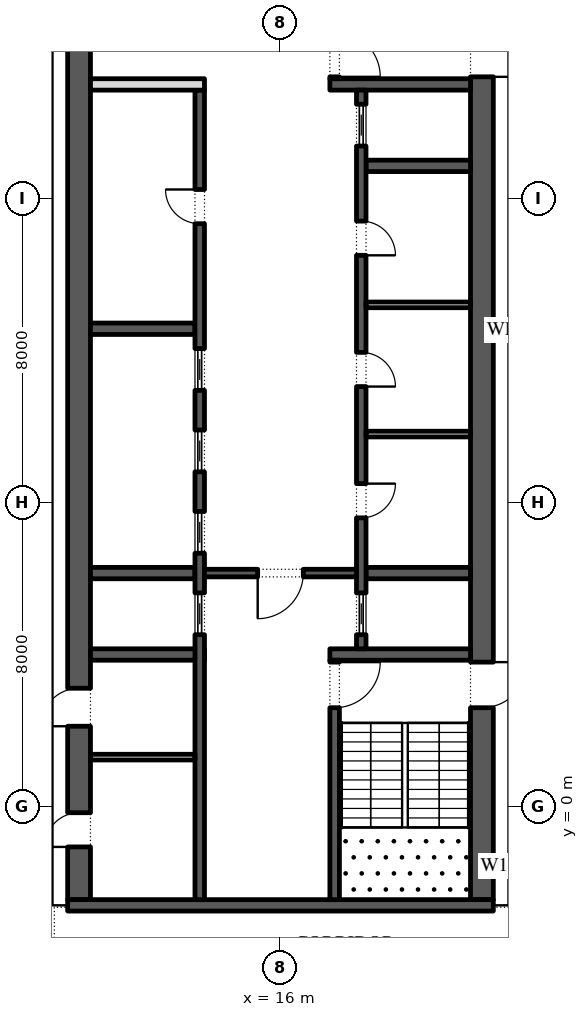
"""IFC4 building model, lengths in metres.
Left out: names, types, materials, properties, quantities, classifications, styles, units other than length and angle.
Written with IfcOpenShell. Run it as: python <this file> out.ifc"""

import sys

from ifc_helpers import new_model, si_unit, direction, frame, frame_2d, origin, place, context, subcontext, project, spatial, rectangle, extrude, element, fill, save


model = new_model("IFC4")
c1 = context("Model", 3, precision=1e-05, world=origin(), true_north=direction((0.0, 1.0)))
c2 = subcontext(c1, "Body", "Model", "MODEL_VIEW")
j1 = project(units=[si_unit("LENGTHUNIT", "METRE"), si_unit("PLANEANGLEUNIT", "RADIAN")], contexts=[c1])
p1 = place(None, origin())
s1 = spatial("IfcSite", under=j1, at=p1, CompositionType="ELEMENT")
p2 = place(p1, origin())
s2 = spatial("IfcBuilding", under=s1, at=p2, CompositionType="ELEMENT")
p3 = place(p2, frame((0.0, 0.0, 264.0)))
s3 = spatial("IfcBuildingStorey", under=s2, at=p3, CompositionType="ELEMENT", Elevation=264.0)
p4 = place(p3, frame((21.359, -11.678, 0.0), z_axis=(0.0, 0.0, 1.0), x_axis=(0.224949198343, 0.974370493275, 0.0)))
e1 = element("IfcWall", 1, at=p4, inside=s3, PredefinedType="STANDARD", context=c2, shape_type="SweptSolid", body=[
    extrude(rectangle(XDim=49.5, YDim=0.3, at=frame_2d((24.75, 0.0))), origin(), (0.0, 0.0, 1.0), 4.0),
])
p5 = place(p4, frame((1.157, 0.0, 0.45)))
e2 = element("IfcOpeningElement", 2, at=p5, cuts=e1, PredefinedType="OPENING", context=c2, shape_type="SweptSolid", body=[
    extrude(rectangle(XDim=4.5, YDim=3.05, at=frame_2d((2.25, 1.525))), frame((0.0, 0.16, 0.0), z_axis=(0.0, -1.0, 0.0), x_axis=(1.0, 0.0, 0.0)), (0.0, 0.0, 1.0), 0.32),
])
p6 = place(p4, frame((8.121, 0.0, 0.45)))
e3 = element("IfcOpeningElement", 3, at=p6, cuts=e1, PredefinedType="OPENING", context=c2, shape_type="SweptSolid", body=[
    extrude(rectangle(XDim=4.5, YDim=3.05, at=frame_2d((2.25, 1.525))), frame((0.0, 0.16, 0.0), z_axis=(0.0, -1.0, 0.0), x_axis=(1.0, 0.0, 0.0)), (0.0, 0.0, 1.0), 0.32),
])
p7 = place(p4, frame((15.236, 0.0, 0.45)))
e4 = element("IfcOpeningElement", 4, at=p7, cuts=e1, PredefinedType="OPENING", context=c2, shape_type="SweptSolid", body=[
    extrude(rectangle(XDim=4.5, YDim=3.05, at=frame_2d((2.25, 1.525))), frame((0.0, 0.16, 0.0), z_axis=(0.0, -1.0, 0.0), x_axis=(1.0, 0.0, 0.0)), (0.0, 0.0, 1.0), 0.32),
])
p8 = place(p4, frame((22.35, 0.0, 0.45)))
e5 = element("IfcOpeningElement", 5, at=p8, cuts=e1, PredefinedType="OPENING", context=c2, shape_type="SweptSolid", body=[
    extrude(rectangle(XDim=4.5, YDim=3.05, at=frame_2d((2.25, 1.525))), frame((0.0, 0.16, 0.0), z_axis=(0.0, -1.0, 0.0), x_axis=(1.0, 0.0, 0.0)), (0.0, 0.0, 1.0), 0.32),
])
p9 = place(p4, frame((29.464, 0.0, 0.45)))
e6 = element("IfcOpeningElement", 6, at=p9, cuts=e1, PredefinedType="OPENING", context=c2, shape_type="SweptSolid", body=[
    extrude(rectangle(XDim=4.5, YDim=2.95, at=frame_2d((2.25, 1.475))), frame((0.0, 0.16, 0.0), z_axis=(0.0, -1.0, 0.0), x_axis=(1.0, 0.0, 0.0)), (0.0, 0.0, 1.0), 0.32),
])
p10 = place(p4, frame((37.628, 0.0, 0.0)))
e7 = element("IfcOpeningElement", 7, at=p10, cuts=e1, PredefinedType="OPENING", context=c2, shape_type="SweptSolid", body=[
    extrude(rectangle(XDim=2.4, YDim=3.325, at=frame_2d((1.2, 1.663))), frame((0.0, 0.16, 0.0), z_axis=(0.0, -1.0, 0.0), x_axis=(1.0, 0.0, 0.0)), (0.0, 0.0, 1.0), 0.32),
])
p11 = place(p4, frame((43.693, 0.0, 0.45)))
e8 = element("IfcOpeningElement", 8, at=p11, cuts=e1, PredefinedType="OPENING", context=c2, shape_type="SweptSolid", body=[
    extrude(rectangle(XDim=4.5, YDim=3.05, at=frame_2d((2.25, 1.525))), frame((0.0, 0.16, 0.0), z_axis=(0.0, -1.0, 0.0), x_axis=(1.0, 0.0, 0.0)), (0.0, 0.0, 1.0), 0.32),
])
p12 = place(p3, frame((21.3, -2.45, 0.0), z_axis=(0.0, 0.0, 1.0), x_axis=(0.0, 1.0, 0.0)))
e9 = element("IfcWall", 9, at=p12, inside=s3, PredefinedType="SHEAR", context=c2, shape_type="SweptSolid", body=[
    extrude(rectangle(XDim=27.9, YDim=0.6, at=frame_2d((13.95, 0.0))), origin(), (0.0, 0.0, 1.0), 4.0),
])
p13 = place(p12, frame((5.05, 0.0, 0.0)))
e10 = element("IfcOpeningElement", 10, at=p13, cuts=e9, PredefinedType="OPENING", context=c2, shape_type="SweptSolid", body=[
    extrude(rectangle(XDim=1.2, YDim=2.1, at=frame_2d((0.6, 1.05))), frame((0.0, 0.31, 0.0), z_axis=(0.0, -1.0, 0.0), x_axis=(1.0, 0.0, 0.0)), (0.0, 0.0, 1.0), 0.62),
])
p14 = place(p12, frame((21.65, 0.0, 0.0)))
e11 = element("IfcOpeningElement", 11, at=p14, cuts=e9, PredefinedType="OPENING", context=c2, shape_type="SweptSolid", body=[
    extrude(rectangle(XDim=1.2, YDim=2.1, at=frame_2d((0.6, 1.05))), frame((0.0, 0.31, 0.0), z_axis=(0.0, -1.0, 0.0), x_axis=(1.0, 0.0, 0.0)), (0.0, 0.0, 1.0), 0.62),
])
p15 = place(p3, frame((10.7, -2.45, 0.0), z_axis=(0.0, 0.0, 1.0), x_axis=(0.0, 1.0, 0.0)))
e12 = element("IfcWall", 12, at=p15, inside=s3, PredefinedType="SHEAR", context=c2, shape_type="SweptSolid", body=[
    extrude(rectangle(XDim=27.9, YDim=0.6, at=frame_2d((13.95, 0.0))), origin(), (0.0, 0.0, 1.0), 4.0),
])
p16 = place(p15, frame((23.65, 0.0, 0.0)))
e13 = element("IfcOpeningElement", 13, at=p16, cuts=e12, PredefinedType="OPENING", context=c2, shape_type="SweptSolid", body=[
    extrude(rectangle(XDim=2.4, YDim=2.1, at=frame_2d((1.2, 1.05))), frame((0.0, 0.31, 0.0), z_axis=(0.0, -1.0, 0.0), x_axis=(1.0, 0.0, 0.0)), (0.0, 0.0, 1.0), 0.62),
])
p17 = place(p15, frame((1.387, 0.0, 0.0)))
e14 = element("IfcOpeningElement", 14, at=p17, cuts=e12, PredefinedType="OPENING", context=c2, shape_type="SweptSolid", body=[
    extrude(rectangle(XDim=0.9, YDim=2.1, at=frame_2d((0.45, 1.05))), frame((0.0, 0.31, 0.0), z_axis=(0.0, -1.0, 0.0), x_axis=(1.0, 0.0, 0.0)), (0.0, 0.0, 1.0), 0.62),
])
p18 = place(p15, frame((4.562, 0.0, 0.0)))
e15 = element("IfcOpeningElement", 15, at=p18, cuts=e12, PredefinedType="OPENING", context=c2, shape_type="SweptSolid", body=[
    extrude(rectangle(XDim=1.0, YDim=2.1, at=frame_2d((0.5, 1.05))), frame((0.0, 0.31, 0.0), z_axis=(0.0, -1.0, 0.0), x_axis=(1.0, 0.0, 0.0)), (0.0, 0.0, 1.0), 0.62),
])
p19 = place(p3, frame((10.4, -2.6, 0.0), z_axis=(0.0, 0.0, 1.0), x_axis=(1.0, 0.0, 0.0)))
e16 = element("IfcWall", 16, at=p19, inside=s3, PredefinedType="SHEAR", context=c2, shape_type="SweptSolid", body=[
    extrude(rectangle(XDim=11.2, YDim=0.3, at=frame_2d((5.6, 0.0))), origin(), (0.0, 0.0, 1.0), 4.0),
])
p20 = place(p3, frame((17.3, 4.0, 0.0), z_axis=(0.0, 0.0, 1.0), x_axis=(1.0, 0.0, 0.0)))
e17 = element("IfcWall", 17, at=p20, inside=s3, PredefinedType="SHEAR", context=c2, shape_type="SweptSolid", body=[
    extrude(rectangle(XDim=3.7, YDim=0.3, at=frame_2d((1.85, 0.0))), origin(), (0.0, 0.0, 1.0), 4.0),
])
p21 = place(p3, frame((17.425, -2.45, 0.0), z_axis=(0.0, 0.0, 1.0), x_axis=(0.0, 1.0, 0.0)))
e18 = element("IfcWall", 18, at=p21, inside=s3, PredefinedType="SHEAR", context=c2, shape_type="SweptSolid", body=[
    extrude(rectangle(XDim=6.3, YDim=0.25, at=frame_2d((3.15, 0.0))), origin(), (0.0, 0.0, 1.0), 4.0),
])
p22 = place(p21, frame((5.05, 0.0, 0.0)))
e19 = element("IfcOpeningElement", 19, at=p22, cuts=e18, PredefinedType="OPENING", context=c2, shape_type="SweptSolid", body=[
    extrude(rectangle(XDim=1.2, YDim=2.1, at=frame_2d((0.6, 1.05))), frame((0.0, 0.135, 0.0), z_axis=(0.0, -1.0, 0.0), x_axis=(1.0, 0.0, 0.0)), (0.0, 0.0, 1.0), 0.27),
])
p23 = place(p3, frame((17.3, 19.0, 0.0), z_axis=(0.0, 0.0, 1.0), x_axis=(1.0, 0.0, 0.0)))
e20 = element("IfcWall", 20, at=p23, inside=s3, PredefinedType="SHEAR", context=c2, shape_type="SweptSolid", body=[
    extrude(rectangle(XDim=3.7, YDim=0.3, at=frame_2d((1.85, 0.0))), origin(), (0.0, 0.0, 1.0), 4.0),
])
p24 = place(p3, frame((17.425, 19.15, 0.0), z_axis=(0.0, 0.0, 1.0), x_axis=(0.0, 1.0, 0.0)))
e21 = element("IfcWall", 21, at=p24, inside=s3, PredefinedType="SHEAR", context=c2, shape_type="SweptSolid", body=[
    extrude(rectangle(XDim=6.3, YDim=0.25, at=frame_2d((3.15, 0.0))), origin(), (0.0, 0.0, 1.0), 4.0),
])
p25 = place(p24, frame((0.05, 0.0, 0.0)))
e22 = element("IfcOpeningElement", 22, at=p25, cuts=e21, PredefinedType="OPENING", context=c2, shape_type="SweptSolid", body=[
    extrude(rectangle(XDim=1.2, YDim=2.1, at=frame_2d((0.6, 1.05))), frame((0.0, 0.135, 0.0), z_axis=(0.0, -1.0, 0.0), x_axis=(1.0, 0.0, 0.0)), (0.0, 0.0, 1.0), 0.27),
])
for number, where, z_axis, x_axis in (
    (23, (18.25, 6.143, 0.0), (0.0, 0.0, 1.0), (1.0, 0.0, 0.0)),
    (24, (18.25, 16.857, 0.0), (0.0, 0.0, 1.0), (1.0, 0.0, 0.0)),
):
    element("IfcWall", number, at=place(p3, frame(where, z_axis=z_axis, x_axis=x_axis)), inside=s3, PredefinedType="SHEAR", context=c2, shape_type="SweptSolid", body=[
        extrude(rectangle(XDim=2.75, YDim=0.3, at=frame_2d((1.375, 0.0))), origin(), (0.0, 0.0, 1.0), 4.0),
    ])
p26 = place(p3, frame((18.125, 4.15, 0.0), z_axis=(0.0, 0.0, 1.0), x_axis=(0.0, 1.0, 0.0)))
e25 = element("IfcWall", 25, at=p26, inside=s3, PredefinedType="SHEAR", context=c2, shape_type="SweptSolid", body=[
    extrude(rectangle(XDim=14.7, YDim=0.25, at=frame_2d((7.35, 0.0))), origin(), (0.0, 0.0, 1.0), 4.0),
])
p27 = place(p26, frame((3.446, 0.0, 0.0)))
e26 = element("IfcOpeningElement", 26, at=p27, cuts=e25, PredefinedType="OPENING", context=c2, shape_type="SweptSolid", body=[
    extrude(rectangle(XDim=0.9, YDim=2.1, at=frame_2d((0.45, 1.05))), frame((0.0, 0.135, 0.0), z_axis=(0.0, -1.0, 0.0), x_axis=(1.0, 0.0, 0.0)), (0.0, 0.0, 1.0), 0.27),
])
p28 = place(p26, frame((6.9, 0.0, 0.0)))
e27 = element("IfcOpeningElement", 27, at=p28, cuts=e25, PredefinedType="OPENING", context=c2, shape_type="SweptSolid", body=[
    extrude(rectangle(XDim=0.9, YDim=2.1, at=frame_2d((0.45, 1.05))), frame((0.0, 0.135, 0.0), z_axis=(0.0, -1.0, 0.0), x_axis=(1.0, 0.0, 0.0)), (0.0, 0.0, 1.0), 0.27),
])
p29 = place(p26, frame((10.354, 0.0, 0.0)))
e28 = element("IfcOpeningElement", 28, at=p29, cuts=e25, PredefinedType="OPENING", context=c2, shape_type="SweptSolid", body=[
    extrude(rectangle(XDim=0.9, YDim=2.1, at=frame_2d((0.45, 1.05))), frame((0.0, 0.135, 0.0), z_axis=(0.0, -1.0, 0.0), x_axis=(1.0, 0.0, 0.0)), (0.0, 0.0, 1.0), 0.27),
])
p30 = place(p26, frame((0.371, 0.0, 0.0)))
e29 = element("IfcOpeningElement", 29, at=p30, cuts=e25, PredefinedType="OPENING", context=c2, shape_type="SweptSolid", body=[
    extrude(rectangle(XDim=1.1, YDim=2.1, at=frame_2d((0.55, 1.05))), frame((0.0, 0.135, 0.0), z_axis=(0.0, -1.0, 0.0), x_axis=(1.0, 0.0, 0.0)), (0.0, 0.0, 1.0), 0.27),
])
p31 = place(p26, frame((13.229, 0.0, 0.0)))
e30 = element("IfcOpeningElement", 30, at=p31, cuts=e25, PredefinedType="OPENING", context=c2, shape_type="SweptSolid", body=[
    extrude(rectangle(XDim=1.1, YDim=2.1, at=frame_2d((0.55, 1.05))), frame((0.0, 0.135, 0.0), z_axis=(0.0, -1.0, 0.0), x_axis=(1.0, 0.0, 0.0)), (0.0, 0.0, 1.0), 0.27),
])
for number, where, z_axis, x_axis in (
    (31, (18.25, 9.8, 0.0), (0.0, 0.0, 1.0), (1.0, 0.0, 0.0)),
    (32, (18.25, 13.2, 0.0), (0.0, 0.0, 1.0), (1.0, 0.0, 0.0)),
):
    element("IfcWall", number, at=place(p3, frame(where, z_axis=z_axis, x_axis=x_axis)), inside=s3, PredefinedType="PARTITIONING", context=c2, shape_type="SweptSolid", body=[
        extrude(rectangle(XDim=2.75, YDim=0.15, at=frame_2d((1.375, 0.0))), origin(), (0.0, 0.0, 1.0), 4.0),
    ])
p32 = place(p3, frame((11.0, 4.0, 0.0), z_axis=(0.0, 0.0, 1.0), x_axis=(1.0, 0.0, 0.0)))
e33 = element("IfcWall", 33, at=p32, inside=s3, PredefinedType="SHEAR", context=c2, shape_type="SweptSolid", body=[
    extrude(rectangle(XDim=3.0, YDim=0.3, at=frame_2d((1.5, 0.0))), origin(), (0.0, 0.0, 1.0), 4.0),
])
for number, where, z_axis, x_axis in (
    (34, (11.0, 6.143, 0.0), (0.0, 0.0, 1.0), (1.0, 0.0, 0.0)),
    (35, (11.0, 12.571, 0.0), (0.0, 0.0, 1.0), (1.0, 0.0, 0.0)),
):
    element("IfcWall", number, at=place(p3, frame(where, z_axis=z_axis, x_axis=x_axis)), inside=s3, PredefinedType="SHEAR", context=c2, shape_type="SweptSolid", body=[
        extrude(rectangle(XDim=2.75, YDim=0.3, at=frame_2d((1.375, 0.0))), origin(), (0.0, 0.0, 1.0), 4.0),
    ])
p33 = place(p3, frame((13.875, -2.45, 0.0), z_axis=(0.0, 0.0, 1.0), x_axis=(0.0, 1.0, 0.0)))
e36 = element("IfcWall", 36, at=p33, inside=s3, PredefinedType="SHEAR", context=c2, shape_type="SweptSolid", body=[
    extrude(rectangle(XDim=21.3, YDim=0.25, at=frame_2d((10.65, 0.0))), origin(), (0.0, 0.0, 1.0), 4.0),
])
p34 = place(p33, frame((17.786, 0.0, 0.0)))
e37 = element("IfcOpeningElement", 37, at=p34, cuts=e36, PredefinedType="OPENING", context=c2, shape_type="SweptSolid", body=[
    extrude(rectangle(XDim=0.9, YDim=2.1, at=frame_2d((0.45, 1.05))), frame((0.0, 0.135, 0.0), z_axis=(0.0, -1.0, 0.0), x_axis=(1.0, 0.0, 0.0)), (0.0, 0.0, 1.0), 0.27),
])
p35 = place(p33, frame((6.971, 0.0, 0.0)))
e38 = element("IfcOpeningElement", 38, at=p35, cuts=e36, PredefinedType="OPENING", context=c2, shape_type="SweptSolid", body=[
    extrude(rectangle(XDim=1.1, YDim=2.1, at=frame_2d((0.55, 1.05))), frame((0.0, 0.135, 0.0), z_axis=(0.0, -1.0, 0.0), x_axis=(1.0, 0.0, 0.0)), (0.0, 0.0, 1.0), 0.27),
])
p36 = place(p33, frame((9.114, 0.0, 0.0)))
e39 = element("IfcOpeningElement", 39, at=p36, cuts=e36, PredefinedType="OPENING", context=c2, shape_type="SweptSolid", body=[
    extrude(rectangle(XDim=1.1, YDim=2.1, at=frame_2d((0.55, 1.05))), frame((0.0, 0.135, 0.0), z_axis=(0.0, -1.0, 0.0), x_axis=(1.0, 0.0, 0.0)), (0.0, 0.0, 1.0), 0.27),
])
p37 = place(p33, frame((11.257, 0.0, 0.0)))
e40 = element("IfcOpeningElement", 40, at=p37, cuts=e36, PredefinedType="OPENING", context=c2, shape_type="SweptSolid", body=[
    extrude(rectangle(XDim=1.1, YDim=2.1, at=frame_2d((0.55, 1.05))), frame((0.0, 0.135, 0.0), z_axis=(0.0, -1.0, 0.0), x_axis=(1.0, 0.0, 0.0)), (0.0, 0.0, 1.0), 0.27),
])
p38 = place(p33, frame((13.4, 0.0, 0.0)))
e41 = element("IfcOpeningElement", 41, at=p38, cuts=e36, PredefinedType="OPENING", context=c2, shape_type="SweptSolid", body=[
    extrude(rectangle(XDim=1.1, YDim=2.1, at=frame_2d((0.55, 1.05))), frame((0.0, 0.135, 0.0), z_axis=(0.0, -1.0, 0.0), x_axis=(1.0, 0.0, 0.0)), (0.0, 0.0, 1.0), 0.27),
])
p39 = place(p3, frame((11.0, 19.0, 0.0), z_axis=(0.0, 0.0, 1.0), x_axis=(1.0, 0.0, 0.0)))
e42 = element("IfcWall", 42, at=p39, inside=s3, PredefinedType="PARTITIONING", context=c2, shape_type="SweptSolid", body=[
    extrude(rectangle(XDim=3.0, YDim=0.3, at=frame_2d((1.5, 0.0))), origin(), (0.0, 0.0, 1.0), 4.0),
])
p40 = place(p3, frame((14.0, 6.143, 0.0), z_axis=(0.0, 0.0, 1.0), x_axis=(1.0, 0.0, 0.0)))
e43 = element("IfcWall", 43, at=p40, inside=s3, PredefinedType="SHEAR", context=c2, shape_type="SweptSolid", body=[
    extrude(rectangle(XDim=4.0, YDim=0.2, at=frame_2d((2.0, 0.0))), origin(), (0.0, 0.0, 1.0), 4.0),
])
p41 = place(p40, frame((1.4, 0.0, 0.0)))
e44 = element("IfcOpeningElement", 44, at=p41, cuts=e43, PredefinedType="OPENING", context=c2, shape_type="SweptSolid", body=[
    extrude(rectangle(XDim=1.2, YDim=2.1, at=frame_2d((0.6, 1.05))), frame((0.0, 0.11, 0.0), z_axis=(0.0, -1.0, 0.0), x_axis=(1.0, 0.0, 0.0)), (0.0, 0.0, 1.0), 0.22),
])
p42 = place(p3, frame((11.0, 1.3, 0.0), z_axis=(0.0, 0.0, 1.0), x_axis=(1.0, 0.0, 0.0)))
e45 = element("IfcWall", 45, at=p42, inside=s3, PredefinedType="PARTITIONING", context=c2, shape_type="SweptSolid", body=[
    extrude(rectangle(XDim=2.75, YDim=0.15, at=frame_2d((1.375, 0.0))), origin(), (0.0, 0.0, 1.0), 4.0),
])
p43 = place(p27, frame((0.9, -0.2, 0.0), z_axis=(0.0, 0.0, 1.0), x_axis=(-1.0, 0.0, 0.0)))
e46 = element("IfcDoor", 46, at=p43, inside=s3, OperationType="SINGLE_SWING_RIGHT", PredefinedType="DOOR", context=c2, shape_type="SweptSolid", body=[
    extrude(rectangle(XDim=0.9, YDim=2.1, at=frame_2d((0.45, 1.05))), frame((0.0, -0.075, 0.0), z_axis=(0.0, -1.0, 0.0), x_axis=(1.0, 0.0, 0.0)), (0.0, 0.0, 1.0), 0.05),
])
fill(e26, e46)
p44 = place(p28, frame((0.9, -0.2, 0.0), z_axis=(0.0, 0.0, 1.0), x_axis=(-1.0, 0.0, 0.0)))
e47 = element("IfcDoor", 47, at=p44, inside=s3, OperationType="SINGLE_SWING_LEFT", PredefinedType="DOOR", context=c2, shape_type="SweptSolid", body=[
    extrude(rectangle(XDim=0.9, YDim=2.1, at=frame_2d((0.45, 1.05))), frame((0.0, -0.075, 0.0), z_axis=(0.0, -1.0, 0.0), x_axis=(1.0, 0.0, 0.0)), (0.0, 0.0, 1.0), 0.05),
])
fill(e27, e47)
p45 = place(p29, frame((0.9, -0.2, 0.0), z_axis=(0.0, 0.0, 1.0), x_axis=(-1.0, 0.0, 0.0)))
e48 = element("IfcDoor", 48, at=p45, inside=s3, OperationType="SINGLE_SWING_LEFT", PredefinedType="DOOR", context=c2, shape_type="SweptSolid", body=[
    extrude(rectangle(XDim=0.9, YDim=2.1, at=frame_2d((0.45, 1.05))), frame((0.0, -0.075, 0.0), z_axis=(0.0, -1.0, 0.0), x_axis=(1.0, 0.0, 0.0)), (0.0, 0.0, 1.0), 0.05),
])
fill(e28, e48)
p46 = place(p30, origin())
e49 = element("IfcDoor", 49, at=p46, inside=s3, OperationType="SLIDING_TO_LEFT", PredefinedType="DOOR", context=c2, shape_type="SweptSolid", body=[
    extrude(rectangle(XDim=1.1, YDim=2.1, at=frame_2d((0.55, 1.05))), frame((0.0, 0.025, 0.0), z_axis=(0.0, -1.0, 0.0), x_axis=(1.0, 0.0, 0.0)), (0.0, 0.0, 1.0), 0.05),
])
fill(e29, e49)
p47 = place(p31, origin())
e50 = element("IfcDoor", 50, at=p47, inside=s3, OperationType="SLIDING_TO_LEFT", PredefinedType="DOOR", context=c2, shape_type="SweptSolid", body=[
    extrude(rectangle(XDim=1.1, YDim=2.1, at=frame_2d((0.55, 1.05))), frame((0.0, 0.025, 0.0), z_axis=(0.0, -1.0, 0.0), x_axis=(1.0, 0.0, 0.0)), (0.0, 0.0, 1.0), 0.05),
])
fill(e30, e50)
p48 = place(p34, origin())
e51 = element("IfcDoor", 51, at=p48, inside=s3, OperationType="SINGLE_SWING_LEFT", PredefinedType="DOOR", context=c2, shape_type="SweptSolid", body=[
    extrude(rectangle(XDim=0.9, YDim=2.1, at=frame_2d((0.45, 1.05))), frame((0.0, 0.125, 0.0), z_axis=(0.0, -1.0, 0.0), x_axis=(1.0, 0.0, 0.0)), (0.0, 0.0, 1.0), 0.05),
])
fill(e37, e51)
p49 = place(p35, origin())
e52 = element("IfcDoor", 52, at=p49, inside=s3, OperationType="SLIDING_TO_LEFT", PredefinedType="DOOR", context=c2, shape_type="SweptSolid", body=[
    extrude(rectangle(XDim=1.1, YDim=2.1, at=frame_2d((0.55, 1.05))), frame((0.0, 0.025, 0.0), z_axis=(0.0, -1.0, 0.0), x_axis=(1.0, 0.0, 0.0)), (0.0, 0.0, 1.0), 0.05),
])
fill(e38, e52)
p50 = place(p36, origin())
e53 = element("IfcDoor", 53, at=p50, inside=s3, OperationType="SLIDING_TO_LEFT", PredefinedType="DOOR", context=c2, shape_type="SweptSolid", body=[
    extrude(rectangle(XDim=1.1, YDim=2.1, at=frame_2d((0.55, 1.05))), frame((0.0, 0.025, 0.0), z_axis=(0.0, -1.0, 0.0), x_axis=(1.0, 0.0, 0.0)), (0.0, 0.0, 1.0), 0.05),
])
fill(e39, e53)
p51 = place(p37, origin())
e54 = element("IfcDoor", 54, at=p51, inside=s3, OperationType="SLIDING_TO_LEFT", PredefinedType="DOOR", context=c2, shape_type="SweptSolid", body=[
    extrude(rectangle(XDim=1.1, YDim=2.1, at=frame_2d((0.55, 1.05))), frame((0.0, 0.025, 0.0), z_axis=(0.0, -1.0, 0.0), x_axis=(1.0, 0.0, 0.0)), (0.0, 0.0, 1.0), 0.05),
])
fill(e40, e54)
p52 = place(p38, origin())
e55 = element("IfcDoor", 55, at=p52, inside=s3, OperationType="SLIDING_TO_LEFT", PredefinedType="DOOR", context=c2, shape_type="SweptSolid", body=[
    extrude(rectangle(XDim=1.1, YDim=2.1, at=frame_2d((0.55, 1.05))), frame((0.0, 0.025, 0.0), z_axis=(0.0, -1.0, 0.0), x_axis=(1.0, 0.0, 0.0)), (0.0, 0.0, 1.0), 0.05),
])
fill(e41, e55)
p53 = place(p41, frame((1.2, 0.0, 0.0), z_axis=(0.0, 0.0, 1.0), x_axis=(-1.0, 0.0, 0.0)))
e56 = element("IfcDoor", 56, at=p53, inside=s3, OperationType="SINGLE_SWING_LEFT", PredefinedType="DOOR", context=c2, shape_type="SweptSolid", body=[
    extrude(rectangle(XDim=1.2, YDim=2.1, at=frame_2d((0.6, 1.05))), frame((0.0, 0.025, 0.0), z_axis=(0.0, -1.0, 0.0), x_axis=(1.0, 0.0, 0.0)), (0.0, 0.0, 1.0), 0.05),
])
fill(e44, e56)
p54 = place(p22, frame((1.2, 0.0, 0.0), z_axis=(0.0, 0.0, 1.0), x_axis=(-1.0, 0.0, 0.0)))
e57 = element("IfcDoor", 57, at=p54, inside=s3, OperationType="SINGLE_SWING_RIGHT", PredefinedType="DOOR", context=c2, shape_type="SweptSolid", body=[
    extrude(rectangle(XDim=1.2, YDim=2.1, at=frame_2d((0.6, 1.05))), frame((0.0, 0.025, 0.0), z_axis=(0.0, -1.0, 0.0), x_axis=(1.0, 0.0, 0.0)), (0.0, 0.0, 1.0), 0.05),
])
fill(e19, e57)
p55 = place(p13, frame((1.2, 0.0, 0.0), z_axis=(0.0, 0.0, 1.0), x_axis=(-1.0, 0.0, 0.0)))
e58 = element("IfcDoor", 58, at=p55, inside=s3, OperationType="SINGLE_SWING_RIGHT", PredefinedType="DOOR", context=c2, shape_type="SweptSolid", body=[
    extrude(rectangle(XDim=1.2, YDim=2.1, at=frame_2d((0.6, 1.05))), frame((0.0, 0.025, 0.0), z_axis=(0.0, -1.0, 0.0), x_axis=(1.0, 0.0, 0.0)), (0.0, 0.0, 1.0), 0.05),
])
fill(e10, e58)
p56 = place(p25, frame((1.2, 0.0, 0.0), z_axis=(0.0, 0.0, 1.0), x_axis=(-1.0, 0.0, 0.0)))
e59 = element("IfcDoor", 59, at=p56, inside=s3, OperationType="SINGLE_SWING_LEFT", PredefinedType="DOOR", context=c2, shape_type="SweptSolid", body=[
    extrude(rectangle(XDim=1.2, YDim=2.1, at=frame_2d((0.6, 1.05))), frame((0.0, 0.025, 0.0), z_axis=(0.0, -1.0, 0.0), x_axis=(1.0, 0.0, 0.0)), (0.0, 0.0, 1.0), 0.05),
])
fill(e22, e59)
p57 = place(p14, frame((1.2, 0.0, 0.0), z_axis=(0.0, 0.0, 1.0), x_axis=(-1.0, 0.0, 0.0)))
e60 = element("IfcDoor", 60, at=p57, inside=s3, OperationType="SINGLE_SWING_LEFT", PredefinedType="DOOR", context=c2, shape_type="SweptSolid", body=[
    extrude(rectangle(XDim=1.2, YDim=2.1, at=frame_2d((0.6, 1.05))), frame((0.0, 0.025, 0.0), z_axis=(0.0, -1.0, 0.0), x_axis=(1.0, 0.0, 0.0)), (0.0, 0.0, 1.0), 0.05),
])
fill(e11, e60)
p58 = place(p17, origin())
e61 = element("IfcDoor", 61, at=p58, inside=s3, OperationType="SINGLE_SWING_RIGHT", PredefinedType="DOOR", context=c2, shape_type="SweptSolid", body=[
    extrude(rectangle(XDim=0.9, YDim=2.1, at=frame_2d((0.45, 1.05))), frame((0.0, -0.25, 0.0), z_axis=(0.0, -1.0, 0.0), x_axis=(1.0, 0.0, 0.0)), (0.0, 0.0, 1.0), 0.05),
])
fill(e14, e61)
p59 = place(p18, origin())
e62 = element("IfcDoor", 62, at=p59, inside=s3, OperationType="SINGLE_SWING_RIGHT", PredefinedType="DOOR", context=c2, shape_type="SweptSolid", body=[
    extrude(rectangle(XDim=1.0, YDim=2.1, at=frame_2d((0.5, 1.05))), frame((0.0, -0.25, 0.0), z_axis=(0.0, -1.0, 0.0), x_axis=(1.0, 0.0, 0.0)), (0.0, 0.0, 1.0), 0.05),
])
fill(e15, e62)
save(model, sys.argv[1])
